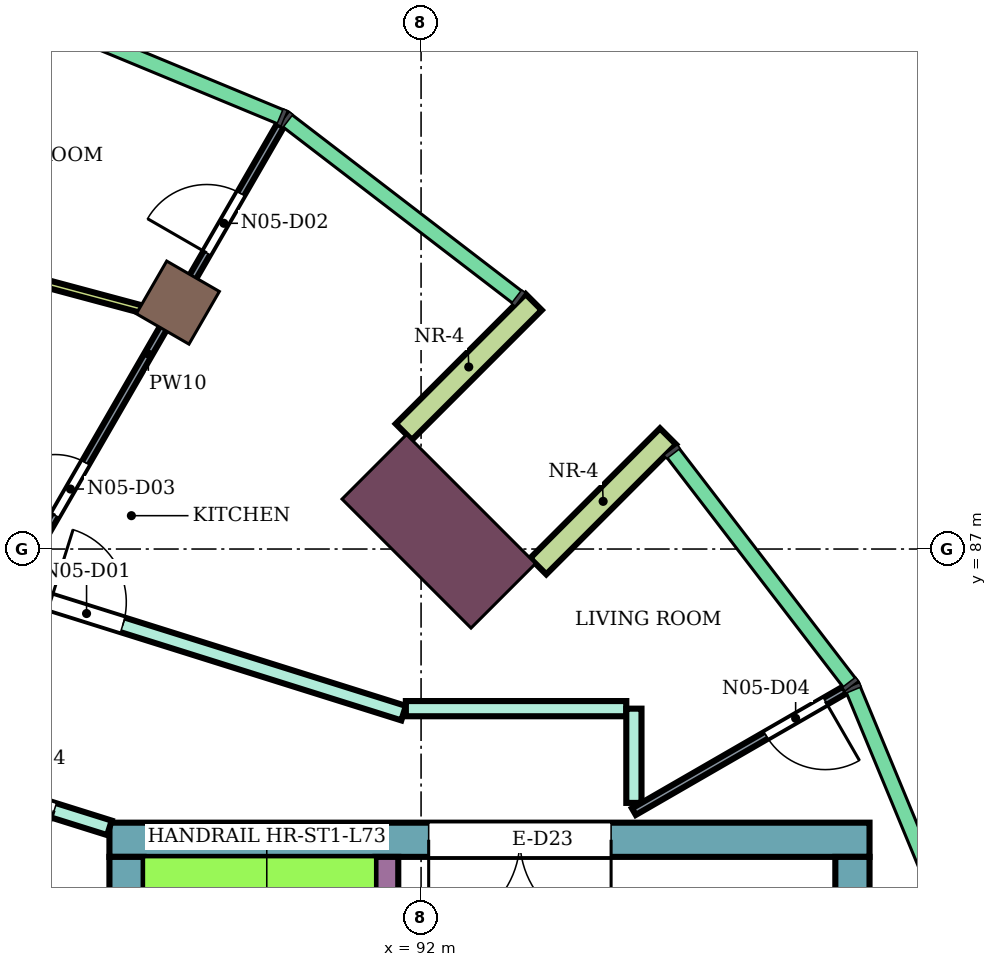
"""IFC4 building model, lengths in metres.
Left out: names, types, materials, properties, quantities, classifications, styles, units other than length and angle.
Written with IfcOpenShell. Run it as: python <this file> out.ifc"""

import sys

from ifc_helpers import new_model, si_unit, direction, frame, frame_2d, origin, origin_2d, place, context, subcontext, project, spatial, rectangle, extrude, element, fill, save


model = new_model("IFC4")
c1 = context("Model", 3, precision=1e-05, world=origin(), true_north=direction((0.0, 1.0)))
c2 = subcontext(c1, "Body", "Model", "MODEL_VIEW")
j1 = project(units=[si_unit("LENGTHUNIT", "METRE"), si_unit("PLANEANGLEUNIT", "RADIAN")], contexts=[c1])
p1 = place(None, origin())
s1 = spatial("IfcSite", under=j1, at=p1, CompositionType="ELEMENT")
p2 = place(p1, origin())
s2 = spatial("IfcBuilding", under=s1, at=p2, CompositionType="ELEMENT")
p3 = place(p2, frame((0.0, 0.0, 319.3)))
s3 = spatial("IfcBuildingStorey", under=s2, at=p3, CompositionType="ELEMENT", Elevation=319.3)
p4 = place(p3, frame((88.8, 90.242, 0.0), z_axis=(0.0, 0.0, 1.0), x_axis=(0.5, 0.866025403784, 0.0)))
e1 = element("IfcColumn", 1, at=p4, inside=s3, PredefinedType="COLUMN", context=c2, shape_type="SweptSolid", body=[
    extrude(rectangle(XDim=0.8, YDim=0.8, at=origin_2d()), origin(), (0.0, 0.0, 1.0), 4.4),
])
p5 = place(p3, frame((92.233, 87.233, 0.0), z_axis=(0.0, 0.0, 1.0), x_axis=(0.707106781187, 0.707106781187, 0.0)))
e2 = element("IfcColumn", 2, at=p5, inside=s3, PredefinedType="COLUMN", context=c2, shape_type="SweptSolid", body=[
    extrude(rectangle(XDim=1.2, YDim=2.4, at=origin_2d()), origin(), (0.0, 0.0, 1.0), 4.4),
])
p6 = place(p3, frame((87.9, 83.175, 0.0), z_axis=(0.0, 0.0, 1.0), x_axis=(1.0, 0.0, 0.0)))
e3 = element("IfcWall", 3, at=p6, inside=s3, PredefinedType="SHEAR", context=c2, shape_type="SweptSolid", body=[
    extrude(rectangle(XDim=10.0, YDim=0.45, at=frame_2d((5.0, 0.0))), origin(), (0.0, 0.0, 1.0), 4.08),
])
p7 = place(p6, frame((4.2, 0.0, 0.0)))
e4 = element("IfcOpeningElement", 4, at=p7, cuts=e3, PredefinedType="OPENING", context=c2, shape_type="SweptSolid", body=[
    extrude(rectangle(XDim=2.4, YDim=2.4, at=frame_2d((1.2, 1.2))), frame((0.0, 0.235, 0.0), z_axis=(0.0, -1.0, 0.0), x_axis=(1.0, 0.0, 0.0)), (0.0, 0.0, 1.0), 0.47),
])
p8 = place(p3, frame((88.125, 75.0, 0.0), z_axis=(0.0, 0.0, 1.0), x_axis=(0.0, 1.0, 0.0)))
e5 = element("IfcWall", 5, at=p8, inside=s3, PredefinedType="SHEAR", context=c2, shape_type="SweptSolid", body=[
    extrude(rectangle(XDim=7.95, YDim=0.45, at=frame_2d((3.975, 0.0))), origin(), (0.0, 0.0, 1.0), 4.08),
])
p9 = place(p3, frame((97.675, 73.6, 0.0), z_axis=(0.0, 0.0, 1.0), x_axis=(0.0, 1.0, 0.0)))
e6 = element("IfcWall", 6, at=p9, inside=s3, PredefinedType="SHEAR", context=c2, shape_type="SweptSolid", body=[
    extrude(rectangle(XDim=9.35, YDim=0.45, at=frame_2d((4.675, 0.0))), origin(), (0.0, 0.0, 1.0), 4.08),
])
p10 = place(p3, frame((91.55, 75.0, 0.0), z_axis=(0.0, 0.0, 1.0), x_axis=(0.0, 1.0, 0.0)))
e7 = element("IfcWall", 7, at=p10, inside=s3, PredefinedType="SHEAR", context=c2, shape_type="SweptSolid", body=[
    extrude(rectangle(XDim=7.95, YDim=0.3, at=frame_2d((3.975, 0.0))), origin(), (0.0, 0.0, 1.0), 4.08),
])
p11 = place(p10, frame((1.85, 0.0, 0.0)))
e8 = element("IfcOpeningElement", 8, at=p11, cuts=e7, PredefinedType="OPENING", context=c2, shape_type="SweptSolid", body=[
    extrude(rectangle(XDim=0.9, YDim=2.1, at=frame_2d((0.45, 1.05))), frame((0.0, 0.16, 0.0), z_axis=(0.0, -1.0, 0.0), x_axis=(1.0, 0.0, 0.0)), (0.0, 0.0, 1.0), 0.32),
])
for number, where, z_axis, x_axis in (
    (9, (93.541, 86.773, 0.0), (0.0, 0.0, 1.0), (0.707, 0.707, 0.0)),
    (10, (91.773, 88.541, 0.0), (0.0, 0.0, 1.0), (0.707, 0.707, 0.0)),
):
    element("IfcWall", number, at=place(p3, frame(where, z_axis=z_axis, x_axis=x_axis)), inside=s3, PredefinedType="NOTDEFINED", context=c2, shape_type="SweptSolid", body=[
        extrude(rectangle(XDim=2.416, YDim=0.3, at=frame_2d((1.208, 0.0))), origin(), (0.0, 0.0, 1.0), 4.4),
    ])
p12 = place(p3, frame((85.587, 84.057, 0.0), z_axis=(0.0, 0.0, 1.0), x_axis=(0.954239513179, -0.299043393987, 0.0)))
e11 = element("IfcWall", 11, at=p12, inside=s3, PredefinedType="PARTITIONING", context=c2, shape_type="SweptSolid", body=[
    extrude(rectangle(XDim=2.424, YDim=0.2, at=frame_2d((1.212, 0.0))), origin(), (0.0, 0.0, 1.0), 3.95),
])
p13 = place(p12, frame((0.762, 0.0, 0.0)))
e12 = element("IfcOpeningElement", 12, at=p13, cuts=e11, PredefinedType="OPENING", context=c2, shape_type="SweptSolid", body=[
    extrude(rectangle(XDim=0.9, YDim=2.1, at=frame_2d((0.45, 1.05))), frame((0.0, 0.11, 0.0), z_axis=(0.0, -1.0, 0.0), x_axis=(1.0, 0.0, 0.0)), (0.0, 0.0, 1.0), 0.22),
])
p14 = place(p3, frame((86.313, 86.555, 0.0), z_axis=(0.0, 0.0, 1.0), x_axis=(0.9540216201, -0.299737799389, 0.0)))
e13 = element("IfcWall", 13, at=p14, inside=s3, PredefinedType="PARTITIONING", context=c2, shape_type="SweptSolid", body=[
    extrude(rectangle(XDim=5.719, YDim=0.2, at=frame_2d((2.86, 0.0))), origin(), (0.0, 0.0, 1.0), 3.95),
])
p15 = place(p14, frame((0.848, 0.0, 0.0)))
e14 = element("IfcOpeningElement", 14, at=p15, cuts=e13, PredefinedType="OPENING", context=c2, shape_type="SweptSolid", body=[
    extrude(rectangle(XDim=1.0, YDim=2.1, at=frame_2d((0.5, 1.05))), frame((0.0, 0.11, 0.0), z_axis=(0.0, -1.0, 0.0), x_axis=(1.0, 0.0, 0.0)), (0.0, 0.0, 1.0), 0.22),
])
p16 = place(p3, frame((91.8, 84.9, 0.0), z_axis=(0.0, 0.0, 1.0), x_axis=(1.0, 0.0, 0.0)))
e15 = element("IfcWall", 15, at=p16, inside=s3, PredefinedType="PARTITIONING", context=c2, shape_type="SweptSolid", body=[
    extrude(rectangle(XDim=2.9, YDim=0.2, at=frame_2d((1.45, 0.0))), origin(), (0.0, 0.0, 1.0), 3.95),
])
p17 = place(p3, frame((94.8, 83.66, 0.0), z_axis=(0.0, 0.0, 1.0), x_axis=(0.0, 1.0, 0.0)))
e16 = element("IfcWall", 16, at=p17, inside=s3, PredefinedType="PARTITIONING", context=c2, shape_type="SweptSolid", body=[
    extrude(rectangle(XDim=1.24, YDim=0.2, at=frame_2d((0.62, 0.0))), origin(), (0.0, 0.0, 1.0), 3.95),
])
p18 = place(p3, frame((80.106, 92.359, 0.0), z_axis=(0.0, 0.0, 1.0), x_axis=(0.965889909151, -0.258953052501, 0.0)))
e17 = element("IfcWall", 17, at=p18, inside=s3, PredefinedType="PARTITIONING", context=c2, shape_type="SweptSolid", body=[
    extrude(rectangle(XDim=8.83, YDim=0.1, at=frame_2d((4.415, 0.0))), origin(), (0.0, 0.0, 1.0), 3.28),
])
p19 = place(p18, frame((3.076, 0.0, 0.0)))
e18 = element("IfcOpeningElement", 18, at=p19, cuts=e17, PredefinedType="OPENING", context=c2, shape_type="SweptSolid", body=[
    extrude(rectangle(XDim=0.9, YDim=2.1, at=frame_2d((0.45, 1.05))), frame((0.0, 0.06, 0.0), z_axis=(0.0, -1.0, 0.0), x_axis=(1.0, 0.0, 0.0)), (0.0, 0.0, 1.0), 0.12),
])
p20 = place(p3, frame((86.673, 86.553, 0.0), z_axis=(0.0, 0.0, 1.0), x_axis=(0.500103298341, 0.865965756245, 0.0)))
e19 = element("IfcWall", 19, at=p20, inside=s3, PredefinedType="PARTITIONING", context=c2, shape_type="SweptSolid", body=[
    extrude(rectangle(XDim=6.955, YDim=0.1, at=frame_2d((3.477, 0.0))), origin(), (0.0, 0.0, 1.0), 3.95),
])
p21 = place(p20, frame((5.015, 0.0, 0.0)))
e20 = element("IfcOpeningElement", 20, at=p21, cuts=e19, PredefinedType="OPENING", context=c2, shape_type="SweptSolid", body=[
    extrude(rectangle(XDim=0.9, YDim=2.1, at=frame_2d((0.45, 1.05))), frame((0.0, 0.06, 0.0), z_axis=(0.0, -1.0, 0.0), x_axis=(1.0, 0.0, 0.0)), (0.0, 0.0, 1.0), 0.12),
])
p22 = place(p20, frame((1.028, 0.0, 0.0)))
e21 = element("IfcOpeningElement", 21, at=p22, cuts=e19, PredefinedType="OPENING", context=c2, shape_type="SweptSolid", body=[
    extrude(rectangle(XDim=0.8, YDim=2.1, at=frame_2d((0.4, 1.05))), frame((0.0, 0.06, 0.0), z_axis=(0.0, -1.0, 0.0), x_axis=(1.0, 0.0, 0.0)), (0.0, 0.0, 1.0), 0.12),
])
p23 = place(p3, frame((94.8, 83.545, 0.0), z_axis=(0.0, 0.0, 1.0), x_axis=(0.866141222235, 0.499799342882, 0.0)))
e22 = element("IfcWall", 22, at=p23, inside=s3, PredefinedType="PARTITIONING", context=c2, shape_type="SweptSolid", body=[
    extrude(rectangle(XDim=3.207, YDim=0.1, at=frame_2d((1.604, 0.0))), origin(), (0.0, 0.0, 1.0), 3.95),
])
p24 = place(p23, frame((2.007, 0.0, 0.0)))
e23 = element("IfcOpeningElement", 23, at=p24, cuts=e22, PredefinedType="OPENING", context=c2, shape_type="SweptSolid", body=[
    extrude(rectangle(XDim=0.9, YDim=2.1, at=frame_2d((0.45, 1.05))), frame((0.0, 0.06, 0.0), z_axis=(0.0, -1.0, 0.0), x_axis=(1.0, 0.0, 0.0)), (0.0, 0.0, 1.0), 0.12),
])
p25 = place(p15, origin())
e24 = element("IfcDoor", 24, at=p25, inside=s3, OperationType="SINGLE_SWING_LEFT", PredefinedType="DOOR", context=c2, shape_type="SweptSolid", body=[
    extrude(rectangle(XDim=1.0, YDim=2.1, at=frame_2d((0.5, 1.05))), frame((0.0, 0.025, 0.0), z_axis=(0.0, -1.0, 0.0), x_axis=(1.0, 0.0, 0.0)), (0.0, 0.0, 1.0), 0.05),
])
fill(e14, e24)
p26 = place(p21, origin())
e25 = element("IfcDoor", 25, at=p26, inside=s3, OperationType="SINGLE_SWING_LEFT", PredefinedType="DOOR", context=c2, shape_type="SweptSolid", body=[
    extrude(rectangle(XDim=0.9, YDim=2.1, at=frame_2d((0.45, 1.05))), frame((0.0, 0.025, 0.0), z_axis=(0.0, -1.0, 0.0), x_axis=(1.0, 0.0, 0.0)), (0.0, 0.0, 1.0), 0.05),
])
fill(e20, e25)
p27 = place(p22, origin())
e26 = element("IfcDoor", 26, at=p27, inside=s3, OperationType="SINGLE_SWING_LEFT", PredefinedType="DOOR", context=c2, shape_type="SweptSolid", body=[
    extrude(rectangle(XDim=0.8, YDim=2.1, at=frame_2d((0.4, 1.05))), frame((0.0, 0.025, 0.0), z_axis=(0.0, -1.0, 0.0), x_axis=(1.0, 0.0, 0.0)), (0.0, 0.0, 1.0), 0.05),
])
fill(e21, e26)
p28 = place(p24, frame((0.9, 0.0, 0.0), z_axis=(0.0, 0.0, 1.0), x_axis=(-1.0, 0.0, 0.0)))
e27 = element("IfcDoor", 27, at=p28, inside=s3, OperationType="SINGLE_SWING_LEFT", PredefinedType="DOOR", context=c2, shape_type="SweptSolid", body=[
    extrude(rectangle(XDim=0.9, YDim=2.1, at=frame_2d((0.45, 1.05))), frame((0.0, 0.025, 0.0), z_axis=(0.0, -1.0, 0.0), x_axis=(1.0, 0.0, 0.0)), (0.0, 0.0, 1.0), 0.05),
])
fill(e23, e27)
p29 = place(p13, frame((0.9, 0.0, 0.0), z_axis=(0.0, 0.0, 1.0), x_axis=(-1.0, 0.0, 0.0)))
e28 = element("IfcDoor", 28, at=p29, inside=s3, OperationType="SINGLE_SWING_LEFT", PredefinedType="DOOR", context=c2, shape_type="SweptSolid", body=[
    extrude(rectangle(XDim=0.9, YDim=2.1, at=frame_2d((0.45, 1.05))), frame((0.0, 0.025, 0.0), z_axis=(0.0, -1.0, 0.0), x_axis=(1.0, 0.0, 0.0)), (0.0, 0.0, 1.0), 0.05),
])
fill(e12, e28)
p30 = place(p7, frame((2.4, 0.0, 0.0), z_axis=(0.0, 0.0, 1.0), x_axis=(-1.0, 0.0, 0.0)))
e29 = element("IfcDoor", 29, at=p30, inside=s3, OperationType="DOUBLE_DOOR_SINGLE_SWING", PredefinedType="DOOR", context=c2, shape_type="SweptSolid", body=[
    extrude(rectangle(XDim=2.4, YDim=2.4, at=frame_2d((1.2, 1.2))), frame((0.0, 0.025, 0.0), z_axis=(0.0, -1.0, 0.0), x_axis=(1.0, 0.0, 0.0)), (0.0, 0.0, 1.0), 0.05),
])
fill(e4, e29)
save(model, sys.argv[1])
